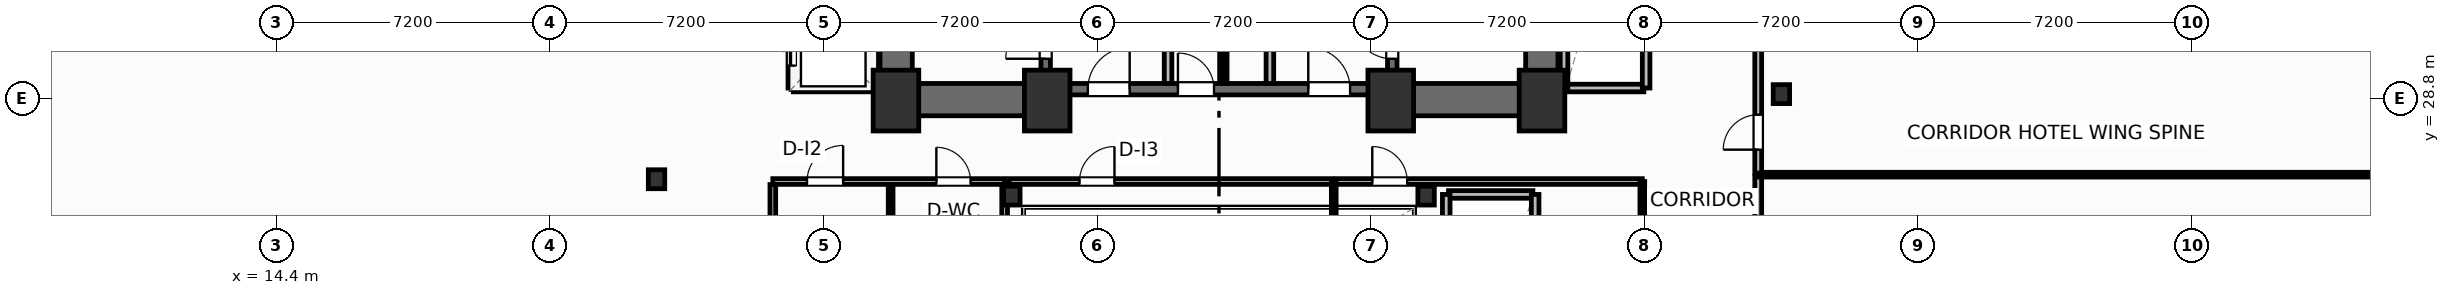
"""IFC4 building model, lengths in metres.
Left out: names, types, materials, properties, quantities, classifications, styles, units other than length and angle.
Written with IfcOpenShell. Run it as: python <this file> out.ifc"""

import sys

from ifc_helpers import new_model, si_unit, direction, frame, frame_2d, origin, origin_2d, place, context, subcontext, project, spatial, rectangle, i_section, extrude, element, fill, save


model = new_model("IFC4")
c1 = context("Model", 3, precision=1e-05, world=origin(), true_north=direction((0.0, 1.0)))
c2 = subcontext(c1, "Body", "Model", "MODEL_VIEW")
j1 = project(units=[si_unit("LENGTHUNIT", "METRE"), si_unit("PLANEANGLEUNIT", "RADIAN")], contexts=[c1])
p1 = place(None, origin())
s1 = spatial("IfcSite", under=j1, at=p1, CompositionType="ELEMENT")
p2 = place(p1, origin())
s2 = spatial("IfcBuilding", under=s1, at=p2, CompositionType="ELEMENT")
p3 = place(p2, frame((0.0, 0.0, 67.7)))
s3 = spatial("IfcBuildingStorey", under=s2, at=p3, CompositionType="ELEMENT", Elevation=67.7)
for number, where, z_axis, x_axis in (
    (1, (30.7, 28.75, 0.0), (0.0, 0.0, 1.0), (1.0, 0.0, 0.0)),
    (2, (34.68, 28.75, 0.0), (0.0, 0.0, 1.0), (1.0, 0.0, 0.0)),
    (3, (43.72, 28.75, 0.0), (0.0, 0.0, 1.0), (1.0, 0.0, 0.0)),
    (4, (47.7, 28.75, 0.0), (0.0, 0.0, 1.0), (1.0, 0.0, 0.0)),
):
    element("IfcColumn", number, at=place(p3, frame(where, z_axis=z_axis, x_axis=x_axis)), inside=s3, PredefinedType="COLUMN", context=c2, shape_type="SweptSolid", body=[
        extrude(rectangle(XDim=1.2, YDim=1.6, at=origin_2d()), origin(), (0.0, 0.0, 1.0), 3.7),
    ])
for number, where, z_axis, x_axis in (
    (5, (33.75, 26.25, 0.0), (0.0, 0.0, 1.0), (1.0, 0.0, 0.0)),
    (6, (44.65, 26.25, 0.0), (0.0, 0.0, 1.0), (1.0, 0.0, 0.0)),
    (7, (24.4, 26.68, 0.0), (0.0, 0.0, 1.0), (1.0, 0.0, 0.0)),
    (8, (54.0, 28.92, 0.0), (0.0, 0.0, 1.0), (1.0, 0.0, 0.0)),
):
    element("IfcColumn", number, at=place(p3, frame(where, z_axis=z_axis, x_axis=x_axis)), inside=s3, PredefinedType="COLUMN", context=c2, shape_type="SweptSolid", body=[
        extrude(i_section(OverallWidth=0.432, OverallDepth=0.498, WebThickness=0.056, FlangeThickness=0.089, FilletRadius=0.025, at=origin_2d()), origin(), (0.0, 0.0, 1.0), 3.7),
    ])
for number, where, z_axis, x_axis in (
    (9, (30.705, 29.2, 0.0), (0.0, 0.0, 1.0), (0.0, 1.0, 0.0)),
    (10, (47.695, 29.2, 0.0), (0.0, 0.0, 1.0), (0.0, 1.0, 0.0)),
):
    element("IfcWall", number, at=place(p3, frame(where, z_axis=z_axis, x_axis=x_axis)), inside=s3, PredefinedType="SHEAR", context=c2, shape_type="SweptSolid", body=[
        extrude(rectangle(XDim=9.22, YDim=0.85, at=frame_2d((4.61, 0.0))), origin(), (0.0, 0.0, 1.0), 3.38),
    ])
for number, where, z_axis, x_axis in (
    (11, (30.28, 28.775, 0.0), (0.0, 0.0, 1.0), (1.0, 0.0, 0.0)),
    (12, (43.6, 28.775, 0.0), (0.0, 0.0, 1.0), (1.0, 0.0, 0.0)),
):
    element("IfcWall", number, at=place(p3, frame(where, z_axis=z_axis, x_axis=x_axis)), inside=s3, PredefinedType="SHEAR", context=c2, shape_type="SweptSolid", body=[
        extrude(rectangle(XDim=4.52, YDim=0.85, at=frame_2d((2.26, 0.0))), origin(), (0.0, 0.0, 1.0), 3.38),
    ])
p4 = place(p3, frame((34.8, 29.05, 0.0), z_axis=(0.0, 0.0, 1.0), x_axis=(1.0, 0.0, 0.0)))
e13 = element("IfcWall", 13, at=p4, inside=s3, PredefinedType="SHEAR", context=c2, shape_type="SweptSolid", body=[
    extrude(rectangle(XDim=8.8, YDim=0.3, at=frame_2d((4.4, 0.0))), origin(), (0.0, 0.0, 1.0), 3.38),
])
p5 = place(p4, frame((0.95, 0.0, 0.0)))
e14 = element("IfcOpeningElement", 14, at=p5, cuts=e13, PredefinedType="OPENING", context=c2, shape_type="SweptSolid", body=[
    extrude(rectangle(XDim=1.1, YDim=2.15, at=frame_2d((0.55, 1.075))), frame((0.0, 0.16, 0.0), z_axis=(0.0, -1.0, 0.0), x_axis=(1.0, 0.0, 0.0)), (0.0, 0.0, 1.0), 0.32),
])
p6 = place(p4, frame((6.75, 0.0, 0.0)))
e15 = element("IfcOpeningElement", 15, at=p6, cuts=e13, PredefinedType="OPENING", context=c2, shape_type="SweptSolid", body=[
    extrude(rectangle(XDim=1.1, YDim=2.15, at=frame_2d((0.55, 1.075))), frame((0.0, 0.16, 0.0), z_axis=(0.0, -1.0, 0.0), x_axis=(1.0, 0.0, 0.0)), (0.0, 0.0, 1.0), 0.32),
])
p7 = place(p4, frame((3.32, 0.0, 0.0)))
e16 = element("IfcOpeningElement", 16, at=p7, cuts=e13, PredefinedType="OPENING", context=c2, shape_type="SweptSolid", body=[
    extrude(rectangle(XDim=0.95, YDim=2.15, at=frame_2d((0.475, 1.075))), frame((0.0, 0.16, 0.0), z_axis=(0.0, -1.0, 0.0), x_axis=(1.0, 0.0, 0.0)), (0.0, 0.0, 1.0), 0.32),
])
p8 = place(p3, frame((34.64, 29.2, 0.0), z_axis=(0.0, 0.0, 1.0), x_axis=(0.0, 1.0, 0.0)))
e17 = element("IfcWall", 17, at=p8, inside=s3, PredefinedType="SHEAR", context=c2, shape_type="SweptSolid", body=[
    extrude(rectangle(XDim=9.22, YDim=0.25, at=frame_2d((4.61, 0.0))), origin(), (0.0, 0.0, 1.0), 3.38),
])
p9 = place(p8, frame((0.65, 0.0, 0.0)))
e18 = element("IfcOpeningElement", 18, at=p9, cuts=e17, PredefinedType="OPENING", context=c2, shape_type="SweptSolid", body=[
    extrude(rectangle(XDim=1.05, YDim=2.15, at=frame_2d((0.525, 1.075))), frame((0.0, 0.135, 0.0), z_axis=(0.0, -1.0, 0.0), x_axis=(1.0, 0.0, 0.0)), (0.0, 0.0, 1.0), 0.27),
])
p10 = place(p3, frame((43.76, 29.2, 0.0), z_axis=(0.0, 0.0, 1.0), x_axis=(0.0, 1.0, 0.0)))
e19 = element("IfcWall", 19, at=p10, inside=s3, PredefinedType="SHEAR", context=c2, shape_type="SweptSolid", body=[
    extrude(rectangle(XDim=9.22, YDim=0.25, at=frame_2d((4.61, 0.0))), origin(), (0.0, 0.0, 1.0), 3.38),
])
p11 = place(p10, frame((0.65, 0.0, 0.0)))
e20 = element("IfcOpeningElement", 20, at=p11, cuts=e19, PredefinedType="OPENING", context=c2, shape_type="SweptSolid", body=[
    extrude(rectangle(XDim=1.05, YDim=2.15, at=frame_2d((0.525, 1.075))), frame((0.0, 0.135, 0.0), z_axis=(0.0, -1.0, 0.0), x_axis=(1.0, 0.0, 0.0)), (0.0, 0.0, 1.0), 0.27),
])
p12 = place(p3, frame((81.127, 26.995, 0.0), z_axis=(0.0, 0.0, 1.0), x_axis=(-0.823530169317, 0.567272474411, 0.0)))
e21 = element("IfcWall", 21, at=p12, inside=s3, PredefinedType="SOLIDWALL", context=c2, shape_type="SweptSolid", body=[
    extrude(rectangle(XDim=23.247, YDim=0.22, at=frame_2d((11.624, 0.0))), origin(), (0.0, 0.0, 1.0), 2.66),
])
p13 = place(p12, frame((10.799, 0.0, 0.8)))
e22 = element("IfcOpeningElement", 22, at=p13, cuts=e21, PredefinedType="OPENING", context=c2, shape_type="SweptSolid", body=[
    extrude(rectangle(XDim=1.65, YDim=1.65, at=frame_2d((0.825, 0.825))), frame((0.0, 0.12, 0.0), z_axis=(0.0, -1.0, 0.0), x_axis=(1.0, 0.0, 0.0)), (0.0, 0.0, 1.0), 0.24),
])
p14 = place(p3, frame((33.68, 26.62, 0.0), z_axis=(0.0, 0.0, 1.0), x_axis=(1.0, 0.0, 0.0)))
e23 = element("IfcWall", 23, at=p14, inside=s3, PredefinedType="PARTITIONING", context=c2, shape_type="SweptSolid", body=[
    extrude(rectangle(XDim=8.5, YDim=0.15, at=frame_2d((4.25, 0.0))), origin(), (0.0, 0.0, 1.0), 3.38),
])
p15 = place(p14, frame((1.85, 0.0, 0.0)))
e24 = element("IfcOpeningElement", 24, at=p15, cuts=e23, PredefinedType="OPENING", context=c2, shape_type="SweptSolid", body=[
    extrude(rectangle(XDim=0.92, YDim=2.05, at=frame_2d((0.46, 1.025))), frame((0.0, 0.085, 0.0), z_axis=(0.0, -1.0, 0.0), x_axis=(1.0, 0.0, 0.0)), (0.0, 0.0, 1.0), 0.17),
])
p16 = place(p3, frame((42.22, 19.32, 0.0), z_axis=(0.0, 0.0, 1.0), x_axis=(0.0, 1.0, 0.0)))
e25 = element("IfcWall", 25, at=p16, inside=s3, PredefinedType="PARTITIONING", context=c2, shape_type="SweptSolid", body=[
    extrude(rectangle(XDim=7.3, YDim=0.125, at=frame_2d((3.65, 0.0))), origin(), (0.0, 0.0, 1.0), 3.38),
])
p17 = place(p3, frame((42.28, 26.62, 0.0), z_axis=(0.0, 0.0, 1.0), x_axis=(1.0, 0.0, 0.0)))
e26 = element("IfcWall", 26, at=p17, inside=s3, PredefinedType="PARTITIONING", context=c2, shape_type="SweptSolid", body=[
    extrude(rectangle(XDim=8.06, YDim=0.15, at=frame_2d((4.03, 0.0))), origin(), (0.0, 0.0, 1.0), 3.38),
])
p18 = place(p17, frame((0.954, 0.0, 0.0)))
e27 = element("IfcOpeningElement", 27, at=p18, cuts=e26, PredefinedType="OPENING", context=c2, shape_type="SweptSolid", body=[
    extrude(rectangle(XDim=0.92, YDim=2.05, at=frame_2d((0.46, 1.025))), frame((0.0, 0.085, 0.0), z_axis=(0.0, -1.0, 0.0), x_axis=(1.0, 0.0, 0.0)), (0.0, 0.0, 1.0), 0.17),
])
p19 = place(p3, frame((50.34, 19.32, 0.0), z_axis=(0.0, 0.0, 1.0), x_axis=(0.0, 1.0, 0.0)))
e28 = element("IfcWall", 28, at=p19, inside=s3, PredefinedType="PARTITIONING", context=c2, shape_type="SweptSolid", body=[
    extrude(rectangle(XDim=7.3, YDim=0.125, at=frame_2d((3.65, 0.0))), origin(), (0.0, 0.0, 1.0), 3.38),
])
p20 = place(p3, frame((53.39, 19.24, 0.0), z_axis=(0.0, 0.0, 1.0), x_axis=(0.0, 1.0, 0.0)))
e29 = element("IfcWall", 29, at=p20, inside=s3, PredefinedType="PARTITIONING", context=c2, shape_type="SweptSolid", body=[
    extrude(rectangle(XDim=7.52, YDim=0.18, at=frame_2d((3.76, 0.0))), origin(), (0.0, 0.0, 1.0), 3.38),
])
p21 = place(p20, frame((2.1, 0.0, 0.0)))
e30 = element("IfcOpeningElement", 30, at=p21, cuts=e29, PredefinedType="OPENING", context=c2, shape_type="SweptSolid", body=[
    extrude(rectangle(XDim=0.92, YDim=2.05, at=frame_2d((0.46, 1.025))), frame((0.0, 0.1, 0.0), z_axis=(0.0, -1.0, 0.0), x_axis=(1.0, 0.0, 0.0)), (0.0, 0.0, 1.0), 0.2),
])
p22 = place(p3, frame((53.39, 26.8, 0.0), z_axis=(0.0, 0.0, 1.0), x_axis=(1.0, 0.0, 0.0)))
e31 = element("IfcWall", 31, at=p22, inside=s3, PredefinedType="PARTITIONING", context=c2, shape_type="SweptSolid", body=[
    extrude(rectangle(XDim=23.61, YDim=0.125, at=frame_2d((11.805, 0.0))), origin(), (0.0, 0.0, 1.0), 3.38),
])
p23 = place(p3, frame((53.39, 26.84, 0.0), z_axis=(0.0, 0.0, 1.0), x_axis=(0.0, 1.0, 0.0)))
e32 = element("IfcWall", 32, at=p23, inside=s3, PredefinedType="PARTITIONING", context=c2, shape_type="SweptSolid", body=[
    extrude(rectangle(XDim=12.46, YDim=0.18, at=frame_2d((6.23, 0.0))), origin(), (0.0, 0.0, 1.0), 3.38),
])
p24 = place(p23, frame((0.618, 0.0, 0.0)))
e33 = element("IfcOpeningElement", 33, at=p24, cuts=e32, PredefinedType="OPENING", context=c2, shape_type="SweptSolid", body=[
    extrude(rectangle(XDim=0.92, YDim=2.05, at=frame_2d((0.46, 1.025))), frame((0.0, 0.1, 0.0), z_axis=(0.0, -1.0, 0.0), x_axis=(1.0, 0.0, 0.0)), (0.0, 0.0, 1.0), 0.2),
])
for number, where, z_axis, x_axis in (
    (34, (37.86, 29.2, 0.0), (0.0, 0.0, 1.0), (0.0, 1.0, 0.0)),
    (35, (40.54, 29.2, 0.0), (0.0, 0.0, 1.0), (0.0, 1.0, 0.0)),
):
    element("IfcWall", number, at=place(p3, frame(where, z_axis=z_axis, x_axis=x_axis)), inside=s3, PredefinedType="PARTITIONING", context=c2, shape_type="SweptSolid", body=[
        extrude(rectangle(XDim=5.18, YDim=0.2, at=frame_2d((2.59, 0.0))), origin(), (0.0, 0.0, 1.0), 3.38),
    ])
p25 = place(p3, frame((39.35, 29.2, 0.0), z_axis=(0.0, 0.0, 1.0), x_axis=(0.0, 1.0, 0.0)))
e36 = element("IfcWall", 36, at=p25, inside=s3, PredefinedType="PARTITIONING", context=c2, shape_type="SweptSolid", body=[
    extrude(rectangle(XDim=5.22, YDim=0.125, at=frame_2d((2.61, 0.0))), origin(), (0.0, 0.0, 1.0), 3.38),
])
p26 = place(p25, frame((2.05, 0.0, 0.0)))
e37 = element("IfcOpeningElement", 37, at=p26, cuts=e36, PredefinedType="OPENING", context=c2, shape_type="SweptSolid", body=[
    extrude(rectangle(XDim=0.85, YDim=2.05, at=frame_2d((0.425, 1.025))), frame((0.0, 0.073, 0.0), z_axis=(0.0, -1.0, 0.0), x_axis=(1.0, 0.0, 0.0)), (0.0, 0.0, 1.0), 0.145),
])
p27 = place(p3, frame((27.46, 26.62, 0.0), z_axis=(0.0, 0.0, 1.0), x_axis=(1.0, 0.0, 0.0)))
e38 = element("IfcWall", 38, at=p27, inside=s3, PredefinedType="PARTITIONING", context=c2, shape_type="SweptSolid", body=[
    extrude(rectangle(XDim=6.1, YDim=0.15, at=frame_2d((3.05, 0.0))), origin(), (0.0, 0.0, 1.0), 2.592),
])
p28 = place(p27, frame((0.9, 0.0, 0.0)))
e39 = element("IfcOpeningElement", 39, at=p28, cuts=e38, PredefinedType="OPENING", context=c2, shape_type="SweptSolid", body=[
    extrude(rectangle(XDim=0.95, YDim=2.05, at=frame_2d((0.475, 1.025))), frame((0.0, 0.085, 0.0), z_axis=(0.0, -1.0, 0.0), x_axis=(1.0, 0.0, 0.0)), (0.0, 0.0, 1.0), 0.17),
])
p29 = place(p27, frame((4.303, 0.0, 0.0)))
e40 = element("IfcOpeningElement", 40, at=p29, cuts=e38, PredefinedType="OPENING", context=c2, shape_type="SweptSolid", body=[
    extrude(rectangle(XDim=0.9, YDim=2.05, at=frame_2d((0.45, 1.025))), frame((0.0, 0.085, 0.0), z_axis=(0.0, -1.0, 0.0), x_axis=(1.0, 0.0, 0.0)), (0.0, 0.0, 1.0), 0.17),
])
p30 = place(p3, frame((30.56, 19.38, 0.0), z_axis=(0.0, 0.0, 1.0), x_axis=(0.0, 1.0, 0.0)))
e41 = element("IfcWall", 41, at=p30, inside=s3, PredefinedType="PARTITIONING", context=c2, shape_type="SweptSolid", body=[
    extrude(rectangle(XDim=7.16, YDim=0.125, at=frame_2d((3.58, 0.0))), origin(), (0.0, 0.0, 1.0), 3.38),
])
p31 = place(p30, frame((1.4, 0.0, 0.0)))
e42 = element("IfcOpeningElement", 42, at=p31, cuts=e41, PredefinedType="OPENING", context=c2, shape_type="SweptSolid", body=[
    extrude(rectangle(XDim=0.92, YDim=2.05, at=frame_2d((0.46, 1.025))), frame((0.0, 0.073, 0.0), z_axis=(0.0, -1.0, 0.0), x_axis=(1.0, 0.0, 0.0)), (0.0, 0.0, 1.0), 0.145),
])
p32 = place(p3, frame((27.46, 19.38, 0.0), z_axis=(0.0, 0.0, 1.0), x_axis=(0.0, 1.0, 0.0)))
e43 = element("IfcWall", 43, at=p32, inside=s3, PredefinedType="PARTITIONING", context=c2, shape_type="SweptSolid", body=[
    extrude(rectangle(XDim=7.16, YDim=0.15, at=frame_2d((3.58, 0.0))), origin(), (0.0, 0.0, 1.0), 3.38),
])
p33 = place(p3, frame((33.56, 19.38, 0.0), z_axis=(0.0, 0.0, 1.0), x_axis=(0.0, 1.0, 0.0)))
e44 = element("IfcWall", 44, at=p33, inside=s3, PredefinedType="PARTITIONING", context=c2, shape_type="SweptSolid", body=[
    extrude(rectangle(XDim=7.16, YDim=0.15, at=frame_2d((3.58, 0.0))), origin(), (0.0, 0.0, 1.0), 1.165),
])
p34 = place(p3, frame((28.0, 29.08, 0.0), z_axis=(0.0, 0.0, 1.0), x_axis=(1.0, 0.0, 0.0)))
e45 = element("IfcWall", 45, at=p34, inside=s3, PredefinedType="PARTITIONING", context=c2, shape_type="SweptSolid", body=[
    extrude(rectangle(XDim=2.1, YDim=0.2, at=frame_2d((1.05, 0.0))), origin(), (0.0, 0.0, 1.0), 3.38),
])
p35 = place(p3, frame((30.12, 29.08, 0.0), z_axis=(0.0, 0.0, 1.0), x_axis=(0.0, 1.0, 0.0)))
e46 = element("IfcWall", 46, at=p35, inside=s3, PredefinedType="PARTITIONING", context=c2, shape_type="SweptSolid", body=[
    extrude(rectangle(XDim=6.89, YDim=0.2, at=frame_2d((3.445, 0.0))), origin(), (0.0, 0.0, 1.0), 3.38),
])
p36 = place(p3, frame((27.96, 29.08, 0.0), z_axis=(0.0, 0.0, 1.0), x_axis=(0.0, 1.0, 0.0)))
e47 = element("IfcWall", 47, at=p36, inside=s3, PredefinedType="PARTITIONING", context=c2, shape_type="SweptSolid", body=[
    extrude(rectangle(XDim=6.89, YDim=0.2, at=frame_2d((3.445, 0.0))), origin(), (0.0, 0.0, 1.0), 3.38),
])
p37 = place(p36, frame((0.59, 0.0, 0.0)))
e48 = element("IfcOpeningElement", 48, at=p37, cuts=e47, PredefinedType="OPENING", context=c2, shape_type="SweptSolid", body=[
    extrude(rectangle(XDim=1.1, YDim=2.15, at=frame_2d((0.55, 1.075))), frame((0.0, 0.11, 0.0), z_axis=(0.0, -1.0, 0.0), x_axis=(1.0, 0.0, 0.0)), (0.0, 0.0, 1.0), 0.22),
])
p38 = place(p36, frame((2.89, 0.0, 0.0)))
e49 = element("IfcOpeningElement", 49, at=p38, cuts=e47, PredefinedType="OPENING", context=c2, shape_type="SweptSolid", body=[
    extrude(rectangle(XDim=1.1, YDim=2.15, at=frame_2d((0.55, 1.075))), frame((0.0, 0.11, 0.0), z_axis=(0.0, -1.0, 0.0), x_axis=(1.0, 0.0, 0.0)), (0.0, 0.0, 1.0), 0.22),
])
p39 = place(p36, frame((5.19, 0.0, 0.0)))
e50 = element("IfcOpeningElement", 50, at=p39, cuts=e47, PredefinedType="OPENING", context=c2, shape_type="SweptSolid", body=[
    extrude(rectangle(XDim=1.1, YDim=2.15, at=frame_2d((0.55, 1.075))), frame((0.0, 0.11, 0.0), z_axis=(0.0, -1.0, 0.0), x_axis=(1.0, 0.0, 0.0)), (0.0, 0.0, 1.0), 0.22),
])
p40 = place(p3, frame((48.32, 29.08, 0.0), z_axis=(0.0, 0.0, 1.0), x_axis=(1.0, 0.0, 0.0)))
e51 = element("IfcWall", 51, at=p40, inside=s3, PredefinedType="PARTITIONING", context=c2, shape_type="SweptSolid", body=[
    extrude(rectangle(XDim=2.06, YDim=0.2, at=frame_2d((1.03, 0.0))), origin(), (0.0, 0.0, 1.0), 2.592),
])
for number, where, z_axis, x_axis in (
    (52, (48.28, 29.08, 0.0), (0.0, 0.0, 1.0), (0.0, 1.0, 0.0)),
    (53, (50.44, 29.08, 0.0), (0.0, 0.0, 1.0), (0.0, 1.0, 0.0)),
):
    element("IfcWall", number, at=place(p3, frame(where, z_axis=z_axis, x_axis=x_axis)), inside=s3, PredefinedType="PARTITIONING", context=c2, shape_type="SweptSolid", body=[
        extrude(rectangle(XDim=6.89, YDim=0.2, at=frame_2d((3.445, 0.0))), origin(), (0.0, 0.0, 1.0), 3.38),
    ])
p41 = place(p3, frame((45.24, 26.28, 0.0), z_axis=(0.0, 0.0, 1.0), x_axis=(1.0, 0.0, 0.0)))
e54 = element("IfcWall", 54, at=p41, inside=s3, PredefinedType="PARTITIONING", context=c2, shape_type="SweptSolid", body=[
    extrude(rectangle(XDim=2.22, YDim=0.2, at=frame_2d((1.11, 0.0))), origin(), (0.0, 0.0, 1.0), 3.38),
])
for number, where, z_axis, x_axis in (
    (55, (45.18, 19.38, 0.0), (0.0, 0.0, 1.0), (0.0, 1.0, 0.0)),
    (56, (47.52, 19.38, 0.0), (0.0, 0.0, 1.0), (0.0, 1.0, 0.0)),
):
    element("IfcWall", number, at=place(p3, frame(where, z_axis=z_axis, x_axis=x_axis)), inside=s3, PredefinedType="PARTITIONING", context=c2, shape_type="SweptSolid", body=[
        extrude(rectangle(XDim=6.9, YDim=0.2, at=frame_2d((3.45, 0.0))), origin(), (0.0, 0.0, 1.0), 3.38),
    ])
p42 = place(p15, origin())
e57 = element("IfcDoor", 57, at=p42, inside=s3, OperationType="SINGLE_SWING_RIGHT", PredefinedType="DOOR", context=c2, shape_type="SweptSolid", body=[
    extrude(rectangle(XDim=0.92, YDim=2.05, at=frame_2d((0.46, 1.025))), frame((0.0, 0.025, 0.0), z_axis=(0.0, -1.0, 0.0), x_axis=(1.0, 0.0, 0.0)), (0.0, 0.0, 1.0), 0.05),
])
fill(e24, e57)
p43 = place(p18, origin())
e58 = element("IfcDoor", 58, at=p43, inside=s3, OperationType="SINGLE_SWING_LEFT", PredefinedType="DOOR", context=c2, shape_type="SweptSolid", body=[
    extrude(rectangle(XDim=0.92, YDim=2.05, at=frame_2d((0.46, 1.025))), frame((0.0, 0.025, 0.0), z_axis=(0.0, -1.0, 0.0), x_axis=(1.0, 0.0, 0.0)), (0.0, 0.0, 1.0), 0.05),
])
fill(e27, e58)
p44 = place(p24, origin())
e59 = element("IfcDoor", 59, at=p44, inside=s3, OperationType="SINGLE_SWING_LEFT", PredefinedType="DOOR", context=c2, shape_type="SweptSolid", body=[
    extrude(rectangle(XDim=0.92, YDim=2.05, at=frame_2d((0.46, 1.025))), frame((0.0, 0.025, 0.0), z_axis=(0.0, -1.0, 0.0), x_axis=(1.0, 0.0, 0.0)), (0.0, 0.0, 1.0), 0.05),
])
fill(e33, e59)
p45 = place(p9, origin())
e60 = element("IfcDoor", 60, at=p45, inside=s3, OperationType="SINGLE_SWING_LEFT", PredefinedType="DOOR", context=c2, shape_type="SweptSolid", body=[
    extrude(rectangle(XDim=1.05, YDim=2.15, at=frame_2d((0.525, 1.075))), frame((0.0, 0.025, 0.0), z_axis=(0.0, -1.0, 0.0), x_axis=(1.0, 0.0, 0.0)), (0.0, 0.0, 1.0), 0.05),
])
fill(e18, e60)
p46 = place(p11, origin())
e61 = element("IfcDoor", 61, at=p46, inside=s3, OperationType="SINGLE_SWING_RIGHT", PredefinedType="DOOR", context=c2, shape_type="SweptSolid", body=[
    extrude(rectangle(XDim=1.05, YDim=2.15, at=frame_2d((0.525, 1.075))), frame((0.0, 0.025, 0.0), z_axis=(0.0, -1.0, 0.0), x_axis=(1.0, 0.0, 0.0)), (0.0, 0.0, 1.0), 0.05),
])
fill(e20, e61)
p47 = place(p5, origin())
e62 = element("IfcDoor", 62, at=p47, inside=s3, OperationType="SINGLE_SWING_RIGHT", PredefinedType="DOOR", context=c2, shape_type="SweptSolid", body=[
    extrude(rectangle(XDim=1.1, YDim=2.15, at=frame_2d((0.55, 1.075))), frame((0.0, 0.025, 0.0), z_axis=(0.0, -1.0, 0.0), x_axis=(1.0, 0.0, 0.0)), (0.0, 0.0, 1.0), 0.05),
])
fill(e14, e62)
p48 = place(p6, origin())
e63 = element("IfcDoor", 63, at=p48, inside=s3, OperationType="SINGLE_SWING_LEFT", PredefinedType="DOOR", context=c2, shape_type="SweptSolid", body=[
    extrude(rectangle(XDim=1.1, YDim=2.15, at=frame_2d((0.55, 1.075))), frame((0.0, 0.025, 0.0), z_axis=(0.0, -1.0, 0.0), x_axis=(1.0, 0.0, 0.0)), (0.0, 0.0, 1.0), 0.05),
])
fill(e15, e63)
p49 = place(p7, origin())
e64 = element("IfcDoor", 64, at=p49, inside=s3, OperationType="SINGLE_SWING_LEFT", PredefinedType="DOOR", context=c2, shape_type="SweptSolid", body=[
    extrude(rectangle(XDim=0.95, YDim=2.15, at=frame_2d((0.475, 1.075))), frame((0.0, 0.025, 0.0), z_axis=(0.0, -1.0, 0.0), x_axis=(1.0, 0.0, 0.0)), (0.0, 0.0, 1.0), 0.05),
])
fill(e16, e64)
p50 = place(p28, origin())
e65 = element("IfcDoor", 65, at=p50, inside=s3, OperationType="SINGLE_SWING_RIGHT", PredefinedType="DOOR", context=c2, shape_type="SweptSolid", body=[
    extrude(rectangle(XDim=0.95, YDim=2.05, at=frame_2d((0.475, 1.025))), frame((0.0, 0.025, 0.0), z_axis=(0.0, -1.0, 0.0), x_axis=(1.0, 0.0, 0.0)), (0.0, 0.0, 1.0), 0.05),
])
fill(e39, e65)
p51 = place(p29, origin())
e66 = element("IfcDoor", 66, at=p51, inside=s3, OperationType="SINGLE_SWING_LEFT", PredefinedType="DOOR", context=c2, shape_type="SweptSolid", body=[
    extrude(rectangle(XDim=0.9, YDim=2.05, at=frame_2d((0.45, 1.025))), frame((0.0, 0.025, 0.0), z_axis=(0.0, -1.0, 0.0), x_axis=(1.0, 0.0, 0.0)), (0.0, 0.0, 1.0), 0.05),
])
fill(e40, e66)
p52 = place(p37, origin())
e67 = element("IfcDoor", 67, at=p52, inside=s3, OperationType="SLIDING_TO_LEFT", PredefinedType="DOOR", context=c2, shape_type="SweptSolid", body=[
    extrude(rectangle(XDim=1.1, YDim=2.15, at=frame_2d((0.55, 1.075))), frame((0.0, 0.025, 0.0), z_axis=(0.0, -1.0, 0.0), x_axis=(1.0, 0.0, 0.0)), (0.0, 0.0, 1.0), 0.05),
])
fill(e48, e67)
save(model, sys.argv[1])
